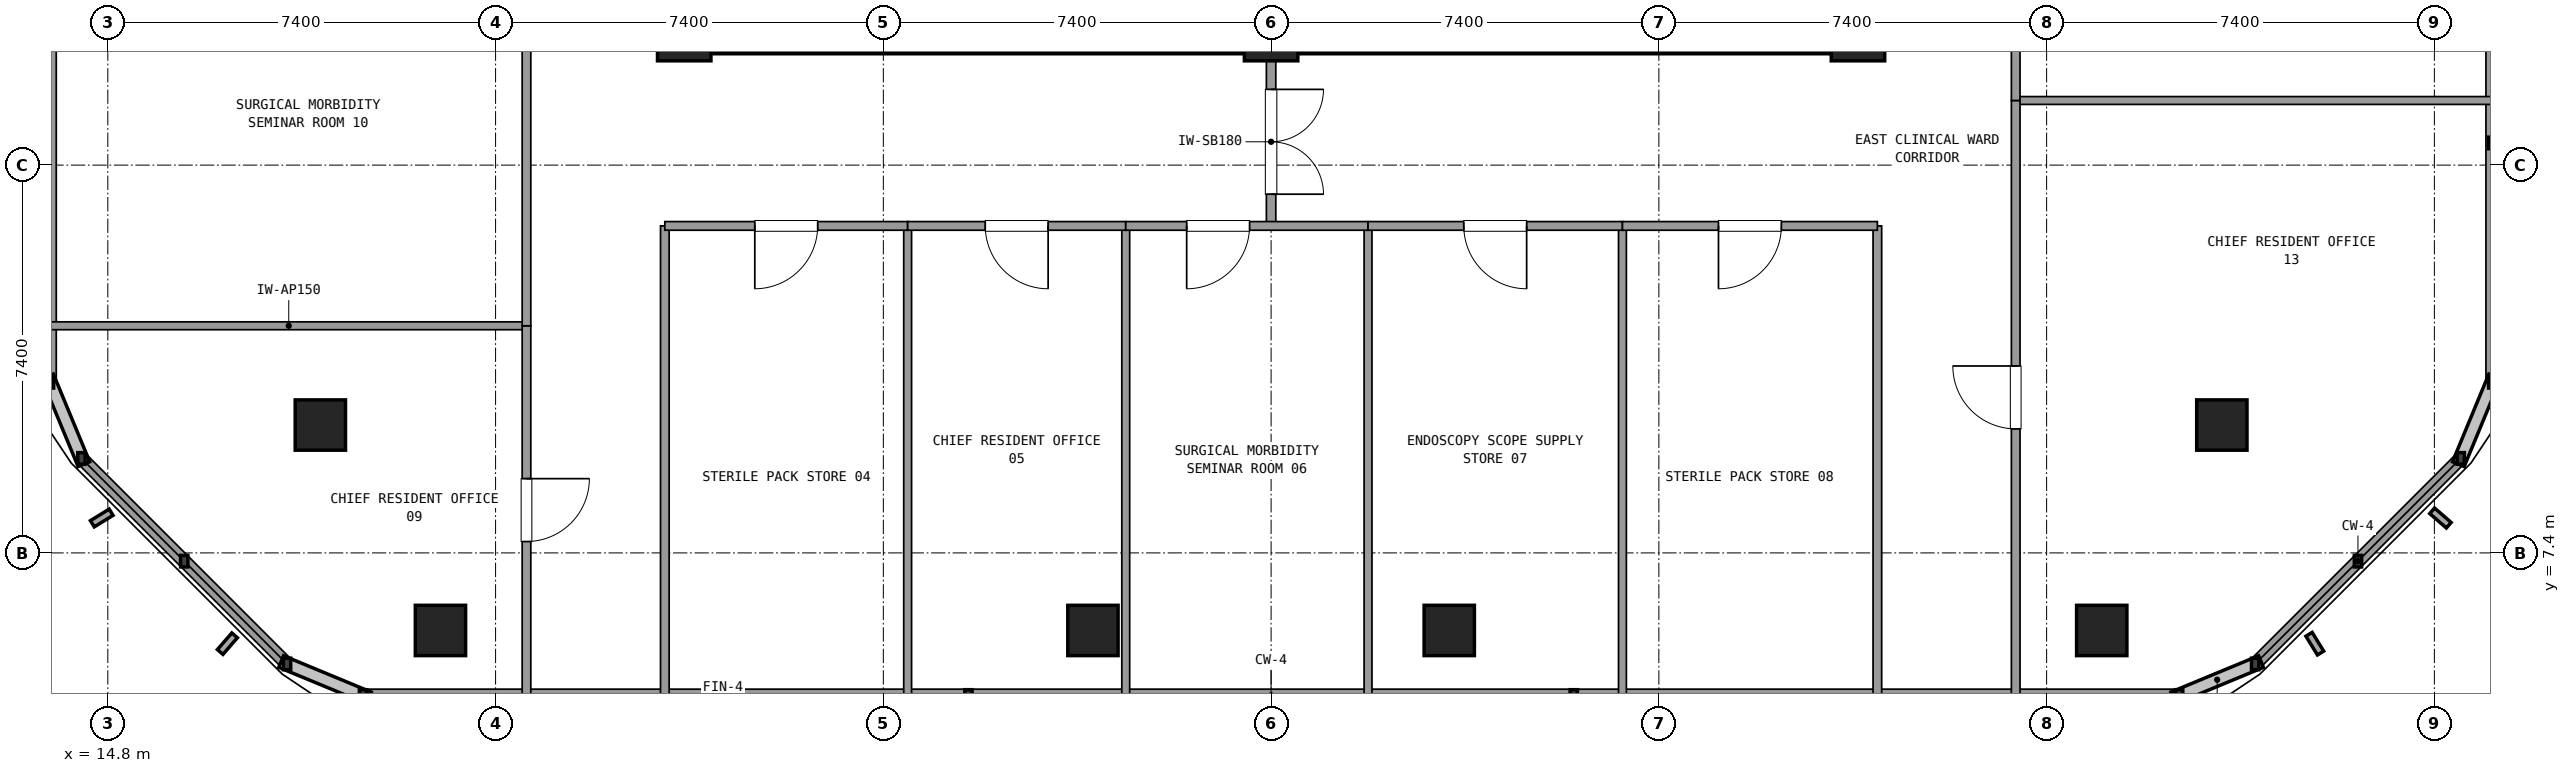
"""IFC4 building model, lengths in metres.
Left out: names, types, materials, properties, quantities, classifications, styles, units other than length and angle.
Written with IfcOpenShell. Run it as: python <this file> out.ifc"""

import sys

from ifc_helpers import new_model, si_unit, direction, frame, frame_2d, origin, origin_2d, place, context, subcontext, project, spatial, rectangle, extrude, element, fill, save


model = new_model("IFC4")
c1 = context("Model", 3, precision=1e-05, world=origin(), true_north=direction((0.0, 1.0)))
c2 = subcontext(c1, "Body", "Model", "MODEL_VIEW")
j1 = project(units=[si_unit("LENGTHUNIT", "METRE"), si_unit("PLANEANGLEUNIT", "RADIAN")], contexts=[c1])
p1 = place(None, origin())
s1 = spatial("IfcSite", under=j1, at=p1, CompositionType="ELEMENT")
p2 = place(p1, origin())
s2 = spatial("IfcBuilding", under=s1, at=p2, CompositionType="ELEMENT")
p3 = place(p2, frame((0.0, 0.0, 174.42)))
s3 = spatial("IfcBuildingStorey", under=s2, at=p3, CompositionType="ELEMENT", Elevation=174.42)
for number, where, z_axis, x_axis in (
    (1, (25.8, 17.3, 0.0), (0.0, 0.0, 1.0), (1.0, 0.0, 0.0)),
    (2, (37.0, 17.3, 0.0), (0.0, 0.0, 1.0), (1.0, 0.0, 0.0)),
    (3, (48.2, 17.3, 0.0), (0.0, 0.0, 1.0), (1.0, 0.0, 0.0)),
):
    element("IfcColumn", number, at=place(p3, frame(where, z_axis=z_axis, x_axis=x_axis)), inside=s3, PredefinedType="COLUMN", context=c2, shape_type="SweptSolid", body=[
        extrude(rectangle(XDim=1.02, YDim=1.02, at=origin_2d()), origin(), (0.0, 0.0, 1.0), 3.6),
    ])
for number, where, z_axis, x_axis in (
    (4, (26.305, 17.3, 0.0), (0.0, 0.0, 1.0), (1.0, 0.0, 0.0)),
    (5, (37.505, 17.3, 0.0), (0.0, 0.0, 1.0), (1.0, 0.0, 0.0)),
):
    element("IfcWall", number, at=place(p3, frame(where, z_axis=z_axis, x_axis=x_axis)), inside=s3, PredefinedType="SHEAR", context=c2, shape_type="SweptSolid", body=[
        extrude(rectangle(XDim=10.19, YDim=0.75, at=frame_2d((5.095, 0.0))), origin(), (0.0, 0.0, 1.0), 3.3),
    ])
for number, where, z_axis, x_axis in (
    (6, (18.856, 9.84, 0.0), (0.0, 0.0, 1.0), (1.0, 0.0, 0.0)),
    (7, (21.148, 5.92, 0.0), (0.0, 0.0, 1.0), (1.0, 0.0, 0.0)),
):
    element("IfcColumn", number, at=place(p3, frame(where, z_axis=z_axis, x_axis=x_axis)), inside=s3, PredefinedType="COLUMN", context=c2, shape_type="SweptSolid", body=[
        extrude(rectangle(XDim=0.96, YDim=0.96, at=origin_2d()), origin(), (0.0, 0.0, 1.0), 3.578),
    ])
for number, where, z_axis, x_axis in (
    (8, (33.6, 5.92, 0.0), (0.0, 0.0, 1.0), (1.0, 0.0, 0.0)),
    (9, (40.4, 5.92, 0.0), (0.0, 0.0, 1.0), (1.0, 0.0, 0.0)),
):
    element("IfcColumn", number, at=place(p3, frame(where, z_axis=z_axis, x_axis=x_axis)), inside=s3, PredefinedType="COLUMN", context=c2, shape_type="SweptSolid", body=[
        extrude(rectangle(XDim=0.96, YDim=0.96, at=origin_2d()), origin(), (0.0, 0.0, 1.0), 3.579),
    ])
for number, where, z_axis, x_axis in (
    (10, (52.852, 5.92, 0.0), (0.0, 0.0, 1.0), (1.0, 0.0, 0.0)),
    (11, (55.144, 9.84, 0.0), (0.0, 0.0, 1.0), (1.0, 0.0, 0.0)),
):
    element("IfcColumn", number, at=place(p3, frame(where, z_axis=z_axis, x_axis=x_axis)), inside=s3, PredefinedType="COLUMN", context=c2, shape_type="SweptSolid", body=[
        extrude(rectangle(XDim=0.96, YDim=0.96, at=origin_2d()), origin(), (0.0, 0.0, 1.0), 3.578),
    ])
p4 = place(p3, frame((19.671, 4.68, 0.0), z_axis=(0.0, 0.0, 1.0), x_axis=(1.0, 0.0, 0.0)))
e12 = element("IfcWall", 12, at=p4, inside=s3, PredefinedType="SOLIDWALL", context=c2, shape_type="SweptSolid", body=[
    extrude(rectangle(XDim=34.658, YDim=0.24, at=frame_2d((17.329, 0.0))), origin(), (0.0, 0.0, 1.0), 0.85),
])
p5 = place(p3, frame((55.78, 5.281, 0.0), z_axis=(0.0, 0.0, 1.0), x_axis=(0.707084777957, 0.707128783731, 0.0)))
e13 = element("IfcWall", 13, at=p5, inside=s3, PredefinedType="SOLIDWALL", context=c2, shape_type="SweptSolid", body=[
    extrude(rectangle(XDim=5.548, YDim=0.24, at=frame_2d((2.774, 0.0))), origin(), (0.0, 0.0, 1.0), 0.85),
])
p6 = place(p3, frame((60.304, 10.655, 0.0), z_axis=(0.0, 0.0, 1.0), x_axis=(0.0, 1.0, 0.0)))
e14 = element("IfcWall", 14, at=p6, inside=s3, PredefinedType="SOLIDWALL", context=c2, shape_type="SweptSolid", body=[
    extrude(rectangle(XDim=13.705, YDim=0.24, at=frame_2d((6.853, 0.0))), origin(), (0.0, 0.0, 1.0), 0.85),
])
p7 = place(p3, frame((13.696, 41.145, 0.0), z_axis=(0.0, 0.0, 1.0), x_axis=(0.0, -1.0, 0.0)))
e15 = element("IfcWall", 15, at=p7, inside=s3, PredefinedType="SOLIDWALL", context=c2, shape_type="SweptSolid", body=[
    extrude(rectangle(XDim=30.49, YDim=0.24, at=frame_2d((15.245, 0.0))), origin(), (0.0, 0.0, 1.0), 0.85),
])
p8 = place(p3, frame((14.297, 9.204, 0.0), z_axis=(0.0, 0.0, 1.0), x_axis=(0.707084777957, -0.707128783731, 0.0)))
e16 = element("IfcWall", 16, at=p8, inside=s3, PredefinedType="SOLIDWALL", context=c2, shape_type="SweptSolid", body=[
    extrude(rectangle(XDim=5.548, YDim=0.24, at=frame_2d((2.774, 0.0))), origin(), (0.0, 0.0, 1.0), 0.85),
])
p9 = place(p3, frame((37.0, 13.64, 0.0), z_axis=(0.0, 0.0, 1.0), x_axis=(0.0, 1.0, 0.0)))
e17 = element("IfcWall", 17, at=p9, inside=s3, PredefinedType="PARTITIONING", context=c2, shape_type="SweptSolid", body=[
    extrude(rectangle(XDim=3.21, YDim=0.18, at=frame_2d((1.605, 0.0))), origin(), (0.0, 0.0, 1.0), 2.59),
])
p10 = place(p9, frame((0.605, 0.0, 0.0)))
e18 = element("IfcOpeningElement", 18, at=p10, cuts=e17, PredefinedType="OPENING", context=c2, shape_type="SweptSolid", body=[
    extrude(rectangle(XDim=2.0, YDim=2.2, at=frame_2d((1.0, 1.1))), frame((0.0, 0.1, 0.0), z_axis=(0.0, -1.0, 0.0), x_axis=(1.0, 0.0, 0.0)), (0.0, 0.0, 1.0), 0.2),
])
for number, where, z_axis, x_axis in (
    (19, (25.43, 4.7, 0.0), (0.0, 0.0, 1.0), (0.0, 1.0, 0.0)),
    (20, (48.57, 4.7, 0.0), (0.0, 0.0, 1.0), (0.0, 1.0, 0.0)),
):
    element("IfcWall", number, at=place(p3, frame(where, z_axis=z_axis, x_axis=x_axis)), inside=s3, PredefinedType="PARTITIONING", context=c2, shape_type="SweptSolid", body=[
        extrude(rectangle(XDim=8.94, YDim=0.165, at=frame_2d((4.47, 0.0))), origin(), (0.0, 0.0, 1.0), 2.59),
    ])
p11 = place(p3, frame((30.064, 13.64, 0.0), z_axis=(0.0, 0.0, 1.0), x_axis=(0.0, -1.0, 0.0)))
e21 = element("IfcWall", 21, at=p11, inside=s3, PredefinedType="PARTITIONING", context=c2, shape_type="SweptSolid", body=[
    extrude(rectangle(XDim=8.94, YDim=0.15, at=frame_2d((4.47, 0.0))), origin(), (0.0, 0.0, 1.0), 2.59),
])
p12 = place(p3, frame((25.43, 13.64, 0.0), z_axis=(0.0, 0.0, 1.0), x_axis=(1.0, 0.0, 0.0)))
e22 = element("IfcWall", 22, at=p12, inside=s3, PredefinedType="PARTITIONING", context=c2, shape_type="SweptSolid", body=[
    extrude(rectangle(XDim=4.634, YDim=0.165, at=frame_2d((2.317, 0.0))), origin(), (0.0, 0.0, 1.0), 2.59),
])
p13 = place(p12, frame((1.717, 0.0, 0.0)))
e23 = element("IfcOpeningElement", 23, at=p13, cuts=e22, PredefinedType="OPENING", context=c2, shape_type="SweptSolid", body=[
    extrude(rectangle(XDim=1.2, YDim=2.15, at=frame_2d((0.6, 1.075))), frame((0.0, 0.093, 0.0), z_axis=(0.0, -1.0, 0.0), x_axis=(1.0, 0.0, 0.0)), (0.0, 0.0, 1.0), 0.185),
])
p14 = place(p3, frame((34.226, 13.64, 0.0), z_axis=(0.0, 0.0, 1.0), x_axis=(0.0, -1.0, 0.0)))
e24 = element("IfcWall", 24, at=p14, inside=s3, PredefinedType="PARTITIONING", context=c2, shape_type="SweptSolid", body=[
    extrude(rectangle(XDim=8.94, YDim=0.15, at=frame_2d((4.47, 0.0))), origin(), (0.0, 0.0, 1.0), 2.59),
])
p15 = place(p3, frame((30.064, 13.64, 0.0), z_axis=(0.0, 0.0, 1.0), x_axis=(1.0, 0.0, 0.0)))
e25 = element("IfcWall", 25, at=p15, inside=s3, PredefinedType="PARTITIONING", context=c2, shape_type="SweptSolid", body=[
    extrude(rectangle(XDim=4.162, YDim=0.165, at=frame_2d((2.081, 0.0))), origin(), (0.0, 0.0, 1.0), 2.59),
])
p16 = place(p15, frame((1.481, 0.0, 0.0)))
e26 = element("IfcOpeningElement", 26, at=p16, cuts=e25, PredefinedType="OPENING", context=c2, shape_type="SweptSolid", body=[
    extrude(rectangle(XDim=1.2, YDim=2.15, at=frame_2d((0.6, 1.075))), frame((0.0, 0.093, 0.0), z_axis=(0.0, -1.0, 0.0), x_axis=(1.0, 0.0, 0.0)), (0.0, 0.0, 1.0), 0.185),
])
p17 = place(p3, frame((38.85, 13.64, 0.0), z_axis=(0.0, 0.0, 1.0), x_axis=(0.0, -1.0, 0.0)))
e27 = element("IfcWall", 27, at=p17, inside=s3, PredefinedType="PARTITIONING", context=c2, shape_type="SweptSolid", body=[
    extrude(rectangle(XDim=8.94, YDim=0.15, at=frame_2d((4.47, 0.0))), origin(), (0.0, 0.0, 1.0), 2.59),
])
p18 = place(p3, frame((34.226, 13.64, 0.0), z_axis=(0.0, 0.0, 1.0), x_axis=(1.0, 0.0, 0.0)))
e28 = element("IfcWall", 28, at=p18, inside=s3, PredefinedType="PARTITIONING", context=c2, shape_type="SweptSolid", body=[
    extrude(rectangle(XDim=4.624, YDim=0.165, at=frame_2d((2.312, 0.0))), origin(), (0.0, 0.0, 1.0), 2.59),
])
p19 = place(p18, frame((1.163, 0.0, 0.0)))
e29 = element("IfcOpeningElement", 29, at=p19, cuts=e28, PredefinedType="OPENING", context=c2, shape_type="SweptSolid", body=[
    extrude(rectangle(XDim=1.2, YDim=2.15, at=frame_2d((0.6, 1.075))), frame((0.0, 0.093, 0.0), z_axis=(0.0, -1.0, 0.0), x_axis=(1.0, 0.0, 0.0)), (0.0, 0.0, 1.0), 0.185),
])
p20 = place(p3, frame((43.705, 13.64, 0.0), z_axis=(0.0, 0.0, 1.0), x_axis=(0.0, -1.0, 0.0)))
e30 = element("IfcWall", 30, at=p20, inside=s3, PredefinedType="PARTITIONING", context=c2, shape_type="SweptSolid", body=[
    extrude(rectangle(XDim=8.94, YDim=0.15, at=frame_2d((4.47, 0.0))), origin(), (0.0, 0.0, 1.0), 2.59),
])
p21 = place(p3, frame((38.85, 13.64, 0.0), z_axis=(0.0, 0.0, 1.0), x_axis=(1.0, 0.0, 0.0)))
e31 = element("IfcWall", 31, at=p21, inside=s3, PredefinedType="PARTITIONING", context=c2, shape_type="SweptSolid", body=[
    extrude(rectangle(XDim=4.855, YDim=0.165, at=frame_2d((2.427, 0.0))), origin(), (0.0, 0.0, 1.0), 2.59),
])
p22 = place(p21, frame((1.827, 0.0, 0.0)))
e32 = element("IfcOpeningElement", 32, at=p22, cuts=e31, PredefinedType="OPENING", context=c2, shape_type="SweptSolid", body=[
    extrude(rectangle(XDim=1.2, YDim=2.15, at=frame_2d((0.6, 1.075))), frame((0.0, 0.093, 0.0), z_axis=(0.0, -1.0, 0.0), x_axis=(1.0, 0.0, 0.0)), (0.0, 0.0, 1.0), 0.185),
])
p23 = place(p3, frame((43.705, 13.64, 0.0), z_axis=(0.0, 0.0, 1.0), x_axis=(1.0, 0.0, 0.0)))
e33 = element("IfcWall", 33, at=p23, inside=s3, PredefinedType="PARTITIONING", context=c2, shape_type="SweptSolid", body=[
    extrude(rectangle(XDim=4.865, YDim=0.165, at=frame_2d((2.433, 0.0))), origin(), (0.0, 0.0, 1.0), 2.59),
])
p24 = place(p23, frame((1.833, 0.0, 0.0)))
e34 = element("IfcOpeningElement", 34, at=p24, cuts=e33, PredefinedType="OPENING", context=c2, shape_type="SweptSolid", body=[
    extrude(rectangle(XDim=1.2, YDim=2.15, at=frame_2d((0.6, 1.075))), frame((0.0, 0.093, 0.0), z_axis=(0.0, -1.0, 0.0), x_axis=(1.0, 0.0, 0.0)), (0.0, 0.0, 1.0), 0.185),
])
p25 = place(p3, frame((22.79, 11.734, 0.0), z_axis=(0.0, 0.0, 1.0), x_axis=(-1.0, 0.0, 0.0)))
e35 = element("IfcWall", 35, at=p25, inside=s3, PredefinedType="PARTITIONING", context=c2, shape_type="SweptSolid", body=[
    extrude(rectangle(XDim=9.074, YDim=0.15, at=frame_2d((4.537, 0.0))), origin(), (0.0, 0.0, 1.0), 2.59),
])
p26 = place(p3, frame((22.79, 4.7, 0.0), z_axis=(0.0, 0.0, 1.0), x_axis=(0.0, 1.0, 0.0)))
e36 = element("IfcWall", 36, at=p26, inside=s3, PredefinedType="PARTITIONING", context=c2, shape_type="SweptSolid", body=[
    extrude(rectangle(XDim=7.034, YDim=0.165, at=frame_2d((3.517, 0.0))), origin(), (0.0, 0.0, 1.0), 2.59),
])
p27 = place(p26, frame((2.917, 0.0, 0.0)))
e37 = element("IfcOpeningElement", 37, at=p27, cuts=e36, PredefinedType="OPENING", context=c2, shape_type="SweptSolid", body=[
    extrude(rectangle(XDim=1.2, YDim=2.15, at=frame_2d((0.6, 1.075))), frame((0.0, 0.093, 0.0), z_axis=(0.0, -1.0, 0.0), x_axis=(1.0, 0.0, 0.0)), (0.0, 0.0, 1.0), 0.185),
])
p28 = place(p3, frame((22.79, 11.734, 0.0), z_axis=(0.0, 0.0, 1.0), x_axis=(0.0, 1.0, 0.0)))
e38 = element("IfcWall", 38, at=p28, inside=s3, PredefinedType="PARTITIONING", context=c2, shape_type="SweptSolid", body=[
    extrude(rectangle(XDim=12.506, YDim=0.165, at=frame_2d((6.253, 0.0))), origin(), (0.0, 0.0, 1.0), 2.59),
])
p29 = place(p28, frame((5.653, 0.0, 0.0)))
e39 = element("IfcOpeningElement", 39, at=p29, cuts=e38, PredefinedType="OPENING", context=c2, shape_type="SweptSolid", body=[
    extrude(rectangle(XDim=1.2, YDim=2.15, at=frame_2d((0.6, 1.075))), frame((0.0, 0.093, 0.0), z_axis=(0.0, -1.0, 0.0), x_axis=(1.0, 0.0, 0.0)), (0.0, 0.0, 1.0), 0.185),
])
p30 = place(p3, frame((51.21, 16.033, 0.0), z_axis=(0.0, 0.0, 1.0), x_axis=(1.0, 0.0, 0.0)))
e40 = element("IfcWall", 40, at=p30, inside=s3, PredefinedType="PARTITIONING", context=c2, shape_type="SweptSolid", body=[
    extrude(rectangle(XDim=9.074, YDim=0.15, at=frame_2d((4.537, 0.0))), origin(), (0.0, 0.0, 1.0), 2.59),
])
p31 = place(p3, frame((51.21, 4.7, 0.0), z_axis=(0.0, 0.0, 1.0), x_axis=(0.0, 1.0, 0.0)))
e41 = element("IfcWall", 41, at=p31, inside=s3, PredefinedType="PARTITIONING", context=c2, shape_type="SweptSolid", body=[
    extrude(rectangle(XDim=11.333, YDim=0.165, at=frame_2d((5.667, 0.0))), origin(), (0.0, 0.0, 1.0), 2.59),
])
p32 = place(p31, frame((5.067, 0.0, 0.0)))
e42 = element("IfcOpeningElement", 42, at=p32, cuts=e41, PredefinedType="OPENING", context=c2, shape_type="SweptSolid", body=[
    extrude(rectangle(XDim=1.2, YDim=2.15, at=frame_2d((0.6, 1.075))), frame((0.0, 0.093, 0.0), z_axis=(0.0, -1.0, 0.0), x_axis=(1.0, 0.0, 0.0)), (0.0, 0.0, 1.0), 0.185),
])
p33 = place(p3, frame((51.21, 16.033, 0.0), z_axis=(0.0, 0.0, 1.0), x_axis=(0.0, 1.0, 0.0)))
e43 = element("IfcWall", 43, at=p33, inside=s3, PredefinedType="PARTITIONING", context=c2, shape_type="SweptSolid", body=[
    extrude(rectangle(XDim=8.207, YDim=0.165, at=frame_2d((4.104, 0.0))), origin(), (0.0, 0.0, 1.0), 2.59),
])
p34 = place(p33, frame((3.503, 0.0, 0.0)))
e44 = element("IfcOpeningElement", 44, at=p34, cuts=e43, PredefinedType="OPENING", context=c2, shape_type="SweptSolid", body=[
    extrude(rectangle(XDim=1.2, YDim=2.15, at=frame_2d((0.6, 1.075))), frame((0.0, 0.093, 0.0), z_axis=(0.0, -1.0, 0.0), x_axis=(1.0, 0.0, 0.0)), (0.0, 0.0, 1.0), 0.185),
])
p35 = place(p10, frame((2.0, 0.0, 0.0), z_axis=(0.0, 0.0, 1.0), x_axis=(-1.0, 0.0, 0.0)))
e45 = element("IfcDoor", 45, at=p35, inside=s3, OperationType="DOUBLE_DOOR_SINGLE_SWING", PredefinedType="DOOR", context=c2, shape_type="SweptSolid", body=[
    extrude(rectangle(XDim=2.0, YDim=2.2, at=frame_2d((1.0, 1.1))), frame((0.0, 0.025, 0.0), z_axis=(0.0, -1.0, 0.0), x_axis=(1.0, 0.0, 0.0)), (0.0, 0.0, 1.0), 0.05),
])
fill(e18, e45)
p36 = place(p13, frame((1.2, 0.0, 0.0), z_axis=(0.0, 0.0, 1.0), x_axis=(-1.0, 0.0, 0.0)))
e46 = element("IfcDoor", 46, at=p36, inside=s3, OperationType="SINGLE_SWING_LEFT", PredefinedType="DOOR", context=c2, shape_type="SweptSolid", body=[
    extrude(rectangle(XDim=1.2, YDim=2.15, at=frame_2d((0.6, 1.075))), frame((0.0, 0.025, 0.0), z_axis=(0.0, -1.0, 0.0), x_axis=(1.0, 0.0, 0.0)), (0.0, 0.0, 1.0), 0.05),
])
fill(e23, e46)
p37 = place(p16, frame((1.2, 0.0, 0.0), z_axis=(0.0, 0.0, 1.0), x_axis=(-1.0, 0.0, 0.0)))
e47 = element("IfcDoor", 47, at=p37, inside=s3, OperationType="SINGLE_SWING_RIGHT", PredefinedType="DOOR", context=c2, shape_type="SweptSolid", body=[
    extrude(rectangle(XDim=1.2, YDim=2.15, at=frame_2d((0.6, 1.075))), frame((0.0, 0.025, 0.0), z_axis=(0.0, -1.0, 0.0), x_axis=(1.0, 0.0, 0.0)), (0.0, 0.0, 1.0), 0.05),
])
fill(e26, e47)
p38 = place(p19, frame((1.2, 0.0, 0.0), z_axis=(0.0, 0.0, 1.0), x_axis=(-1.0, 0.0, 0.0)))
e48 = element("IfcDoor", 48, at=p38, inside=s3, OperationType="SINGLE_SWING_LEFT", PredefinedType="DOOR", context=c2, shape_type="SweptSolid", body=[
    extrude(rectangle(XDim=1.2, YDim=2.15, at=frame_2d((0.6, 1.075))), frame((0.0, 0.025, 0.0), z_axis=(0.0, -1.0, 0.0), x_axis=(1.0, 0.0, 0.0)), (0.0, 0.0, 1.0), 0.05),
])
fill(e29, e48)
p39 = place(p22, frame((1.2, 0.0, 0.0), z_axis=(0.0, 0.0, 1.0), x_axis=(-1.0, 0.0, 0.0)))
e49 = element("IfcDoor", 49, at=p39, inside=s3, OperationType="SINGLE_SWING_RIGHT", PredefinedType="DOOR", context=c2, shape_type="SweptSolid", body=[
    extrude(rectangle(XDim=1.2, YDim=2.15, at=frame_2d((0.6, 1.075))), frame((0.0, 0.025, 0.0), z_axis=(0.0, -1.0, 0.0), x_axis=(1.0, 0.0, 0.0)), (0.0, 0.0, 1.0), 0.05),
])
fill(e32, e49)
p40 = place(p24, frame((1.2, 0.0, 0.0), z_axis=(0.0, 0.0, 1.0), x_axis=(-1.0, 0.0, 0.0)))
e50 = element("IfcDoor", 50, at=p40, inside=s3, OperationType="SINGLE_SWING_LEFT", PredefinedType="DOOR", context=c2, shape_type="SweptSolid", body=[
    extrude(rectangle(XDim=1.2, YDim=2.15, at=frame_2d((0.6, 1.075))), frame((0.0, 0.025, 0.0), z_axis=(0.0, -1.0, 0.0), x_axis=(1.0, 0.0, 0.0)), (0.0, 0.0, 1.0), 0.05),
])
fill(e34, e50)
p41 = place(p27, frame((1.2, 0.0, 0.0), z_axis=(0.0, 0.0, 1.0), x_axis=(-1.0, 0.0, 0.0)))
e51 = element("IfcDoor", 51, at=p41, inside=s3, OperationType="SINGLE_SWING_RIGHT", PredefinedType="DOOR", context=c2, shape_type="SweptSolid", body=[
    extrude(rectangle(XDim=1.2, YDim=2.15, at=frame_2d((0.6, 1.075))), frame((0.0, 0.025, 0.0), z_axis=(0.0, -1.0, 0.0), x_axis=(1.0, 0.0, 0.0)), (0.0, 0.0, 1.0), 0.05),
])
fill(e37, e51)
p42 = place(p32, origin())
e52 = element("IfcDoor", 52, at=p42, inside=s3, OperationType="SINGLE_SWING_RIGHT", PredefinedType="DOOR", context=c2, shape_type="SweptSolid", body=[
    extrude(rectangle(XDim=1.2, YDim=2.15, at=frame_2d((0.6, 1.075))), frame((0.0, 0.025, 0.0), z_axis=(0.0, -1.0, 0.0), x_axis=(1.0, 0.0, 0.0)), (0.0, 0.0, 1.0), 0.05),
])
fill(e42, e52)
save(model, sys.argv[1])
